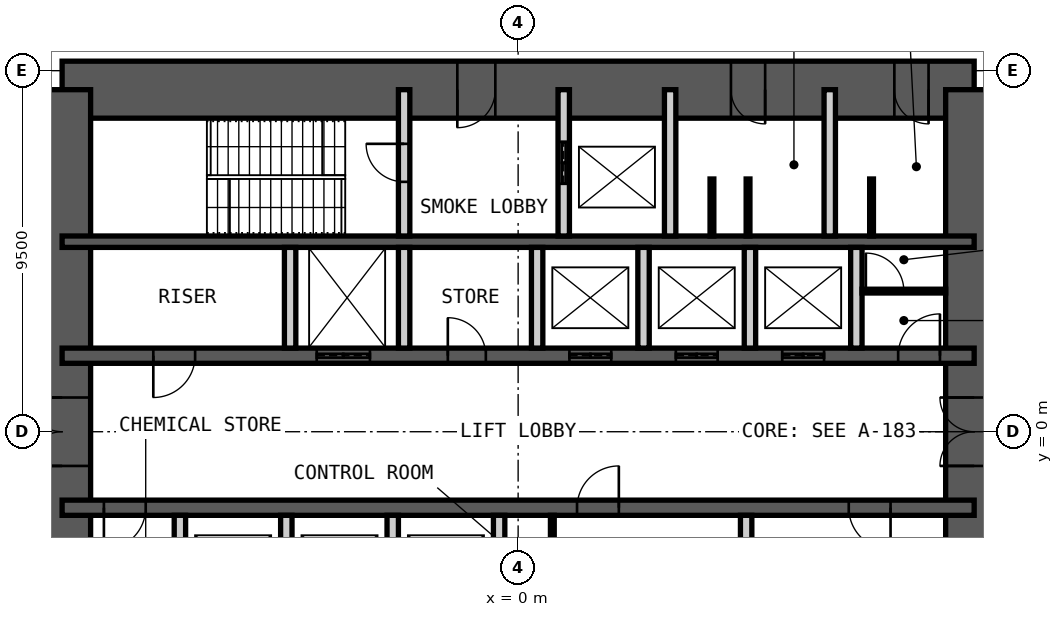
"""IFC4 building model, lengths in metres.
Left out: names, types, materials, properties, quantities, classifications, styles, units other than length and angle.
Written with IfcOpenShell. Run it as: python <this file> out.ifc"""

import sys

from ifc_helpers import new_model, si_unit, direction, frame, frame_2d, origin, place, context, subcontext, project, spatial, rectangle, extrude, element, fill, save


model = new_model("IFC4")
c1 = context("Model", 3, precision=1e-05, world=origin(), true_north=direction((0.0, 1.0)))
c2 = subcontext(c1, "Body", "Model", "MODEL_VIEW")
j1 = project(units=[si_unit("LENGTHUNIT", "METRE"), si_unit("PLANEANGLEUNIT", "RADIAN")], contexts=[c1])
p1 = place(None, origin())
s1 = spatial("IfcSite", under=j1, at=p1, CompositionType="ELEMENT")
p2 = place(p1, origin())
s2 = spatial("IfcBuilding", under=s1, at=p2, CompositionType="ELEMENT")
p3 = place(p2, frame((0.0, 0.0, 22.0)))
s3 = spatial("IfcBuildingStorey", under=s2, at=p3, CompositionType="ELEMENT", Elevation=22.0)
p4 = place(p3, frame((-12.0, 9.0, 0.0), z_axis=(0.0, 0.0, 1.0), x_axis=(1.0, 0.0, 0.0)))
e1 = element("IfcWall", 1, at=p4, inside=s3, PredefinedType="SHEAR", context=c2, shape_type="SweptSolid", body=[
    extrude(rectangle(XDim=24.0, YDim=1.5, at=frame_2d((12.0, 0.0))), origin(), (0.0, 0.0, 1.0), 5.0),
])
p5 = place(p4, frame((10.4, 0.0, 0.0)))
e2 = element("IfcOpeningElement", 2, at=p5, cuts=e1, PredefinedType="OPENING", context=c2, shape_type="SweptSolid", body=[
    extrude(rectangle(XDim=1.0, YDim=2.1, at=frame_2d((0.5, 1.05))), frame((0.0, 0.76, 0.0), z_axis=(0.0, -1.0, 0.0), x_axis=(1.0, 0.0, 0.0)), (0.0, 0.0, 1.0), 1.52),
])
p6 = place(p4, frame((17.6, 0.0, 0.0)))
e3 = element("IfcOpeningElement", 3, at=p6, cuts=e1, PredefinedType="OPENING", context=c2, shape_type="SweptSolid", body=[
    extrude(rectangle(XDim=0.9, YDim=2.1, at=frame_2d((0.45, 1.05))), frame((0.0, 0.76, 0.0), z_axis=(0.0, -1.0, 0.0), x_axis=(1.0, 0.0, 0.0)), (0.0, 0.0, 1.0), 1.52),
])
p7 = place(p4, frame((21.9, 0.0, 0.0)))
e4 = element("IfcOpeningElement", 4, at=p7, cuts=e1, PredefinedType="OPENING", context=c2, shape_type="SweptSolid", body=[
    extrude(rectangle(XDim=0.9, YDim=2.1, at=frame_2d((0.45, 1.05))), frame((0.0, 0.76, 0.0), z_axis=(0.0, -1.0, 0.0), x_axis=(1.0, 0.0, 0.0)), (0.0, 0.0, 1.0), 1.52),
])
p8 = place(p3, frame((12.0, -9.0, 0.0), z_axis=(0.0, 0.0, 1.0), x_axis=(0.0, 1.0, 0.0)))
e5 = element("IfcWall", 5, at=p8, inside=s3, PredefinedType="SHEAR", context=c2, shape_type="SweptSolid", body=[
    extrude(rectangle(XDim=18.0, YDim=1.5, at=frame_2d((9.0, 0.0))), origin(), (0.0, 0.0, 1.0), 5.0),
])
p9 = place(p8, frame((8.1, 0.0, 0.0)))
e6 = element("IfcOpeningElement", 6, at=p9, cuts=e5, PredefinedType="OPENING", context=c2, shape_type="SweptSolid", body=[
    extrude(rectangle(XDim=1.8, YDim=2.1, at=frame_2d((0.9, 1.05))), frame((0.0, 0.76, 0.0), z_axis=(0.0, -1.0, 0.0), x_axis=(1.0, 0.0, 0.0)), (0.0, 0.0, 1.0), 1.52),
])
p10 = place(p3, frame((-12.0, -9.0, 0.0), z_axis=(0.0, 0.0, 1.0), x_axis=(0.0, 1.0, 0.0)))
e7 = element("IfcWall", 7, at=p10, inside=s3, PredefinedType="SHEAR", context=c2, shape_type="SweptSolid", body=[
    extrude(rectangle(XDim=18.0, YDim=1.5, at=frame_2d((9.0, 0.0))), origin(), (0.0, 0.0, 1.0), 5.0),
])
p11 = place(p10, frame((8.1, 0.0, 0.0)))
e8 = element("IfcOpeningElement", 8, at=p11, cuts=e7, PredefinedType="OPENING", context=c2, shape_type="SweptSolid", body=[
    extrude(rectangle(XDim=1.8, YDim=2.1, at=frame_2d((0.9, 1.05))), frame((0.0, 0.76, 0.0), z_axis=(0.0, -1.0, 0.0), x_axis=(1.0, 0.0, 0.0)), (0.0, 0.0, 1.0), 1.52),
])
p12 = place(p3, frame((-12.0, 5.0, 0.0), z_axis=(0.0, 0.0, 1.0), x_axis=(1.0, 0.0, 0.0)))
e9 = element("IfcWall", 9, at=p12, inside=s3, PredefinedType="SHEAR", context=c2, shape_type="SweptSolid", body=[
    extrude(rectangle(XDim=24.0, YDim=0.3, at=frame_2d((12.0, 0.0))), origin(), (0.0, 0.0, 1.0), 5.0),
])
p13 = place(p3, frame((-12.0, 2.0, 0.0), z_axis=(0.0, 0.0, 1.0), x_axis=(1.0, 0.0, 0.0)))
e10 = element("IfcWall", 10, at=p13, inside=s3, PredefinedType="SHEAR", context=c2, shape_type="SweptSolid", body=[
    extrude(rectangle(XDim=24.0, YDim=0.4, at=frame_2d((12.0, 0.0))), origin(), (0.0, 0.0, 1.0), 5.0),
])
p14 = place(p13, frame((2.4, 0.0, 0.0)))
e11 = element("IfcOpeningElement", 11, at=p14, cuts=e10, PredefinedType="OPENING", context=c2, shape_type="SweptSolid", body=[
    extrude(rectangle(XDim=1.1, YDim=2.1, at=frame_2d((0.55, 1.05))), frame((0.0, 0.21, 0.0), z_axis=(0.0, -1.0, 0.0), x_axis=(1.0, 0.0, 0.0)), (0.0, 0.0, 1.0), 0.42),
])
p15 = place(p13, frame((22.0, 0.0, 0.0)))
e12 = element("IfcOpeningElement", 12, at=p15, cuts=e10, PredefinedType="OPENING", context=c2, shape_type="SweptSolid", body=[
    extrude(rectangle(XDim=1.1, YDim=2.1, at=frame_2d((0.55, 1.05))), frame((0.0, 0.21, 0.0), z_axis=(0.0, -1.0, 0.0), x_axis=(1.0, 0.0, 0.0)), (0.0, 0.0, 1.0), 0.42),
])
p16 = place(p13, frame((10.15, 0.0, 0.0)))
e13 = element("IfcOpeningElement", 13, at=p16, cuts=e10, PredefinedType="OPENING", context=c2, shape_type="SweptSolid", body=[
    extrude(rectangle(XDim=1.0, YDim=2.1, at=frame_2d((0.5, 1.05))), frame((0.0, 0.21, 0.0), z_axis=(0.0, -1.0, 0.0), x_axis=(1.0, 0.0, 0.0)), (0.0, 0.0, 1.0), 0.42),
])
p17 = place(p13, frame((6.7, 0.0, 0.0)))
e14 = element("IfcOpeningElement", 14, at=p17, cuts=e10, PredefinedType="OPENING", context=c2, shape_type="SweptSolid", body=[
    extrude(rectangle(XDim=1.4, YDim=2.4, at=frame_2d((0.7, 1.2))), frame((0.0, 0.21, 0.0), z_axis=(0.0, -1.0, 0.0), x_axis=(1.0, 0.0, 0.0)), (0.0, 0.0, 1.0), 0.42),
])
p18 = place(p13, frame((13.35, 0.0, 0.0)))
e15 = element("IfcOpeningElement", 15, at=p18, cuts=e10, PredefinedType="OPENING", context=c2, shape_type="SweptSolid", body=[
    extrude(rectangle(XDim=1.1, YDim=2.4, at=frame_2d((0.55, 1.2))), frame((0.0, 0.21, 0.0), z_axis=(0.0, -1.0, 0.0), x_axis=(1.0, 0.0, 0.0)), (0.0, 0.0, 1.0), 0.42),
])
p19 = place(p13, frame((16.15, 0.0, 0.0)))
e16 = element("IfcOpeningElement", 16, at=p19, cuts=e10, PredefinedType="OPENING", context=c2, shape_type="SweptSolid", body=[
    extrude(rectangle(XDim=1.1, YDim=2.4, at=frame_2d((0.55, 1.2))), frame((0.0, 0.21, 0.0), z_axis=(0.0, -1.0, 0.0), x_axis=(1.0, 0.0, 0.0)), (0.0, 0.0, 1.0), 0.42),
])
p20 = place(p13, frame((18.95, 0.0, 0.0)))
e17 = element("IfcOpeningElement", 17, at=p20, cuts=e10, PredefinedType="OPENING", context=c2, shape_type="SweptSolid", body=[
    extrude(rectangle(XDim=1.1, YDim=2.4, at=frame_2d((0.55, 1.2))), frame((0.0, 0.21, 0.0), z_axis=(0.0, -1.0, 0.0), x_axis=(1.0, 0.0, 0.0)), (0.0, 0.0, 1.0), 0.42),
])
p21 = place(p3, frame((-12.0, -2.0, 0.0), z_axis=(0.0, 0.0, 1.0), x_axis=(1.0, 0.0, 0.0)))
e18 = element("IfcWall", 18, at=p21, inside=s3, PredefinedType="SHEAR", context=c2, shape_type="SweptSolid", body=[
    extrude(rectangle(XDim=24.0, YDim=0.4, at=frame_2d((12.0, 0.0))), origin(), (0.0, 0.0, 1.0), 5.0),
])
p22 = place(p21, frame((1.1, 0.0, 0.0)))
e19 = element("IfcOpeningElement", 19, at=p22, cuts=e18, PredefinedType="OPENING", context=c2, shape_type="SweptSolid", body=[
    extrude(rectangle(XDim=1.1, YDim=2.1, at=frame_2d((0.55, 1.05))), frame((0.0, 0.21, 0.0), z_axis=(0.0, -1.0, 0.0), x_axis=(1.0, 0.0, 0.0)), (0.0, 0.0, 1.0), 0.42),
])
p23 = place(p21, frame((13.55, 0.0, 0.0)))
e20 = element("IfcOpeningElement", 20, at=p23, cuts=e18, PredefinedType="OPENING", context=c2, shape_type="SweptSolid", body=[
    extrude(rectangle(XDim=1.1, YDim=2.1, at=frame_2d((0.55, 1.05))), frame((0.0, 0.21, 0.0), z_axis=(0.0, -1.0, 0.0), x_axis=(1.0, 0.0, 0.0)), (0.0, 0.0, 1.0), 0.42),
])
p24 = place(p21, frame((20.7, 0.0, 0.0)))
e21 = element("IfcOpeningElement", 21, at=p24, cuts=e18, PredefinedType="OPENING", context=c2, shape_type="SweptSolid", body=[
    extrude(rectangle(XDim=1.1, YDim=2.1, at=frame_2d((0.55, 1.05))), frame((0.0, 0.21, 0.0), z_axis=(0.0, -1.0, 0.0), x_axis=(1.0, 0.0, 0.0)), (0.0, 0.0, 1.0), 0.42),
])
p25 = place(p3, frame((-3.0, 5.15, 0.0), z_axis=(0.0, 0.0, 1.0), x_axis=(0.0, 1.0, 0.0)))
e22 = element("IfcWall", 22, at=p25, inside=s3, PredefinedType="PARTITIONING", context=c2, shape_type="SweptSolid", body=[
    extrude(rectangle(XDim=3.85, YDim=0.3, at=frame_2d((1.925, 0.0))), origin(), (0.0, 0.0, 1.0), 4.78),
])
p26 = place(p25, frame((1.425, 0.0, 0.0)))
e23 = element("IfcOpeningElement", 23, at=p26, cuts=e22, PredefinedType="OPENING", context=c2, shape_type="SweptSolid", body=[
    extrude(rectangle(XDim=1.0, YDim=2.1, at=frame_2d((0.5, 1.05))), frame((0.0, 0.16, 0.0), z_axis=(0.0, -1.0, 0.0), x_axis=(1.0, 0.0, 0.0)), (0.0, 0.0, 1.0), 0.32),
])
p27 = place(p3, frame((1.2, 5.15, 0.0), z_axis=(0.0, 0.0, 1.0), x_axis=(0.0, 1.0, 0.0)))
e24 = element("IfcWall", 24, at=p27, inside=s3, PredefinedType="PARTITIONING", context=c2, shape_type="SweptSolid", body=[
    extrude(rectangle(XDim=3.85, YDim=0.3, at=frame_2d((1.925, 0.0))), origin(), (0.0, 0.0, 1.0), 4.78),
])
p28 = place(p27, frame((1.375, 0.0, 0.0)))
e25 = element("IfcOpeningElement", 25, at=p28, cuts=e24, PredefinedType="OPENING", context=c2, shape_type="SweptSolid", body=[
    extrude(rectangle(XDim=1.1, YDim=2.4, at=frame_2d((0.55, 1.2))), frame((0.0, 0.16, 0.0), z_axis=(0.0, -1.0, 0.0), x_axis=(1.0, 0.0, 0.0)), (0.0, 0.0, 1.0), 0.32),
])
for number, where, z_axis, x_axis in (
    (26, (4.0, 5.15, 0.0), (0.0, 0.0, 1.0), (0.0, 1.0, 0.0)),
    (27, (8.2, 5.15, 0.0), (0.0, 0.0, 1.0), (0.0, 1.0, 0.0)),
):
    element("IfcWall", number, at=place(p3, frame(where, z_axis=z_axis, x_axis=x_axis)), inside=s3, PredefinedType="PARTITIONING", context=c2, shape_type="SweptSolid", body=[
        extrude(rectangle(XDim=3.85, YDim=0.3, at=frame_2d((1.925, 0.0))), origin(), (0.0, 0.0, 1.0), 4.78),
    ])
for number, where, z_axis, x_axis in (
    (28, (-6.0, 2.2, 0.0), (0.0, 0.0, 1.0), (0.0, 1.0, 0.0)),
    (29, (-3.0, 2.2, 0.0), (0.0, 0.0, 1.0), (0.0, 1.0, 0.0)),
    (30, (0.5, 2.2, 0.0), (0.0, 0.0, 1.0), (0.0, 1.0, 0.0)),
    (31, (3.3, 2.2, 0.0), (0.0, 0.0, 1.0), (0.0, 1.0, 0.0)),
    (32, (6.1, 2.2, 0.0), (0.0, 0.0, 1.0), (0.0, 1.0, 0.0)),
    (33, (8.9, 2.2, 0.0), (0.0, 0.0, 1.0), (0.0, 1.0, 0.0)),
    (34, (-8.9, -4.85, 0.0), (0.0, 0.0, 1.0), (0.0, 1.0, 0.0)),
    (35, (-6.1, -4.85, 0.0), (0.0, 0.0, 1.0), (0.0, 1.0, 0.0)),
    (36, (-3.3, -4.85, 0.0), (0.0, 0.0, 1.0), (0.0, 1.0, 0.0)),
    (37, (-0.5, -4.85, 0.0), (0.0, 0.0, 1.0), (0.0, 1.0, 0.0)),
    (38, (6.0, -4.85, 0.0), (0.0, 0.0, 1.0), (0.0, 1.0, 0.0)),
):
    element("IfcWall", number, at=place(p3, frame(where, z_axis=z_axis, x_axis=x_axis)), inside=s3, PredefinedType="PARTITIONING", context=c2, shape_type="SweptSolid", body=[
        extrude(rectangle(XDim=2.65, YDim=0.3, at=frame_2d((1.325, 0.0))), origin(), (0.0, 0.0, 1.0), 4.78),
    ])
p29 = place(p3, frame((0.9, -4.85, 0.0), z_axis=(0.0, 0.0, 1.0), x_axis=(0.0, 1.0, 0.0)))
e39 = element("IfcWall", 39, at=p29, inside=s3, PredefinedType="PARTITIONING", context=c2, shape_type="SweptSolid", body=[
    extrude(rectangle(XDim=2.65, YDim=0.1, at=frame_2d((1.325, 0.0))), origin(), (0.0, 0.0, 1.0), 4.78),
])
p30 = place(p29, frame((0.1, 0.0, 0.0)))
e40 = element("IfcOpeningElement", 40, at=p30, cuts=e39, PredefinedType="OPENING", context=c2, shape_type="SweptSolid", body=[
    extrude(rectangle(XDim=1.0, YDim=2.4, at=frame_2d((0.5, 1.2))), frame((0.0, 0.06, 0.0), z_axis=(0.0, -1.0, 0.0), x_axis=(1.0, 0.0, 0.0)), (0.0, 0.0, 1.0), 0.12),
])
p31 = place(p3, frame((9.05, 3.7, 0.0), z_axis=(0.0, 0.0, 1.0), x_axis=(1.0, 0.0, 0.0)))
e41 = element("IfcWall", 41, at=p31, inside=s3, PredefinedType="PARTITIONING", context=c2, shape_type="SweptSolid", body=[
    extrude(rectangle(XDim=2.2, YDim=0.1, at=frame_2d((1.1, 0.0))), origin(), (0.0, 0.0, 1.0), 4.78),
])
p32 = place(p31, frame((0.1, 0.0, 0.0)))
e42 = element("IfcOpeningElement", 42, at=p32, cuts=e41, PredefinedType="OPENING", context=c2, shape_type="SweptSolid", body=[
    extrude(rectangle(XDim=1.0, YDim=2.4, at=frame_2d((0.5, 1.2))), frame((0.0, 0.06, 0.0), z_axis=(0.0, -1.0, 0.0), x_axis=(1.0, 0.0, 0.0)), (0.0, 0.0, 1.0), 0.12),
])
for number, where, z_axis, x_axis in (
    (43, (5.1, 5.15, 0.0), (0.0, 0.0, 1.0), (0.0, 1.0, 0.0)),
    (44, (6.05, 5.15, 0.0), (0.0, 0.0, 1.0), (0.0, 1.0, 0.0)),
    (45, (9.3, 5.15, 0.0), (0.0, 0.0, 1.0), (0.0, 1.0, 0.0)),
):
    element("IfcWall", number, at=place(p3, frame(where, z_axis=z_axis, x_axis=x_axis)), inside=s3, PredefinedType="PARTITIONING", context=c2, shape_type="SweptSolid", body=[
        extrude(rectangle(XDim=1.5, YDim=0.1, at=frame_2d((0.75, 0.0))), origin(), (0.0, 0.0, 1.0), 2.1),
    ])
p33 = place(p5, origin())
e46 = element("IfcDoor", 46, at=p33, inside=s3, OperationType="SINGLE_SWING_LEFT", PredefinedType="DOOR", context=c2, shape_type="SweptSolid", body=[
    extrude(rectangle(XDim=1.0, YDim=2.1, at=frame_2d((0.5, 1.05))), frame((0.0, 0.025, 0.0), z_axis=(0.0, -1.0, 0.0), x_axis=(1.0, 0.0, 0.0)), (0.0, 0.0, 1.0), 0.05),
])
fill(e2, e46)
p34 = place(p6, origin())
e47 = element("IfcDoor", 47, at=p34, inside=s3, OperationType="SINGLE_SWING_RIGHT", PredefinedType="DOOR", context=c2, shape_type="SweptSolid", body=[
    extrude(rectangle(XDim=0.9, YDim=2.1, at=frame_2d((0.45, 1.05))), frame((0.0, 0.025, 0.0), z_axis=(0.0, -1.0, 0.0), x_axis=(1.0, 0.0, 0.0)), (0.0, 0.0, 1.0), 0.05),
])
fill(e3, e47)
p35 = place(p7, origin())
e48 = element("IfcDoor", 48, at=p35, inside=s3, OperationType="SINGLE_SWING_RIGHT", PredefinedType="DOOR", context=c2, shape_type="SweptSolid", body=[
    extrude(rectangle(XDim=0.9, YDim=2.1, at=frame_2d((0.45, 1.05))), frame((0.0, 0.025, 0.0), z_axis=(0.0, -1.0, 0.0), x_axis=(1.0, 0.0, 0.0)), (0.0, 0.0, 1.0), 0.05),
])
fill(e4, e48)
p36 = place(p26, origin())
e49 = element("IfcDoor", 49, at=p36, inside=s3, OperationType="SINGLE_SWING_LEFT", PredefinedType="DOOR", context=c2, shape_type="SweptSolid", body=[
    extrude(rectangle(XDim=1.0, YDim=2.1, at=frame_2d((0.5, 1.05))), frame((0.0, 0.025, 0.0), z_axis=(0.0, -1.0, 0.0), x_axis=(1.0, 0.0, 0.0)), (0.0, 0.0, 1.0), 0.05),
])
fill(e23, e49)
p37 = place(p14, origin())
e50 = element("IfcDoor", 50, at=p37, inside=s3, OperationType="SINGLE_SWING_LEFT", PredefinedType="DOOR", context=c2, shape_type="SweptSolid", body=[
    extrude(rectangle(XDim=1.1, YDim=2.1, at=frame_2d((0.55, 1.05))), frame((0.0, 0.025, 0.0), z_axis=(0.0, -1.0, 0.0), x_axis=(1.0, 0.0, 0.0)), (0.0, 0.0, 1.0), 0.05),
])
fill(e11, e50)
p38 = place(p22, origin())
e51 = element("IfcDoor", 51, at=p38, inside=s3, OperationType="SINGLE_SWING_LEFT", PredefinedType="DOOR", context=c2, shape_type="SweptSolid", body=[
    extrude(rectangle(XDim=1.1, YDim=2.1, at=frame_2d((0.55, 1.05))), frame((0.0, 0.025, 0.0), z_axis=(0.0, -1.0, 0.0), x_axis=(1.0, 0.0, 0.0)), (0.0, 0.0, 1.0), 0.05),
])
fill(e19, e51)
p39 = place(p15, origin())
e52 = element("IfcDoor", 52, at=p39, inside=s3, OperationType="SINGLE_SWING_LEFT", PredefinedType="DOOR", context=c2, shape_type="SweptSolid", body=[
    extrude(rectangle(XDim=1.1, YDim=2.1, at=frame_2d((0.55, 1.05))), frame((0.0, 0.025, 0.0), z_axis=(0.0, -1.0, 0.0), x_axis=(1.0, 0.0, 0.0)), (0.0, 0.0, 1.0), 0.05),
])
fill(e12, e52)
p40 = place(p16, origin())
e53 = element("IfcDoor", 53, at=p40, inside=s3, OperationType="SINGLE_SWING_RIGHT", PredefinedType="DOOR", context=c2, shape_type="SweptSolid", body=[
    extrude(rectangle(XDim=1.0, YDim=2.1, at=frame_2d((0.5, 1.05))), frame((0.0, 0.025, 0.0), z_axis=(0.0, -1.0, 0.0), x_axis=(1.0, 0.0, 0.0)), (0.0, 0.0, 1.0), 0.05),
])
fill(e13, e53)
p41 = place(p23, origin())
e54 = element("IfcDoor", 54, at=p41, inside=s3, OperationType="SINGLE_SWING_LEFT", PredefinedType="DOOR", context=c2, shape_type="SweptSolid", body=[
    extrude(rectangle(XDim=1.1, YDim=2.1, at=frame_2d((0.55, 1.05))), frame((0.0, 0.025, 0.0), z_axis=(0.0, -1.0, 0.0), x_axis=(1.0, 0.0, 0.0)), (0.0, 0.0, 1.0), 0.05),
])
fill(e20, e54)
p42 = place(p24, origin())
e55 = element("IfcDoor", 55, at=p42, inside=s3, OperationType="SINGLE_SWING_RIGHT", PredefinedType="DOOR", context=c2, shape_type="SweptSolid", body=[
    extrude(rectangle(XDim=1.1, YDim=2.1, at=frame_2d((0.55, 1.05))), frame((0.0, 0.025, 0.0), z_axis=(0.0, -1.0, 0.0), x_axis=(1.0, 0.0, 0.0)), (0.0, 0.0, 1.0), 0.05),
])
fill(e21, e55)
p43 = place(p9, origin())
e56 = element("IfcDoor", 56, at=p43, inside=s3, OperationType="DOUBLE_DOOR_DOUBLE_SWING", PredefinedType="DOOR", context=c2, shape_type="SweptSolid", body=[
    extrude(rectangle(XDim=1.8, YDim=2.1, at=frame_2d((0.9, 1.05))), frame((0.0, 0.025, 0.0), z_axis=(0.0, -1.0, 0.0), x_axis=(1.0, 0.0, 0.0)), (0.0, 0.0, 1.0), 0.05),
])
fill(e6, e56)
p44 = place(p11, origin())
e57 = element("IfcDoor", 57, at=p44, inside=s3, OperationType="DOUBLE_DOOR_DOUBLE_SWING", PredefinedType="DOOR", context=c2, shape_type="SweptSolid", body=[
    extrude(rectangle(XDim=1.8, YDim=2.1, at=frame_2d((0.9, 1.05))), frame((0.0, 0.025, 0.0), z_axis=(0.0, -1.0, 0.0), x_axis=(1.0, 0.0, 0.0)), (0.0, 0.0, 1.0), 0.05),
])
fill(e8, e57)
p45 = place(p28, origin())
e58 = element("IfcDoor", 58, at=p45, inside=s3, OperationType="DOUBLE_DOOR_SLIDING", PredefinedType="DOOR", context=c2, shape_type="SweptSolid", body=[
    extrude(rectangle(XDim=1.1, YDim=2.4, at=frame_2d((0.55, 1.2))), frame((0.0, 0.025, 0.0), z_axis=(0.0, -1.0, 0.0), x_axis=(1.0, 0.0, 0.0)), (0.0, 0.0, 1.0), 0.05),
])
fill(e25, e58)
p46 = place(p17, origin())
e59 = element("IfcDoor", 59, at=p46, inside=s3, OperationType="DOUBLE_DOOR_SLIDING", PredefinedType="DOOR", context=c2, shape_type="SweptSolid", body=[
    extrude(rectangle(XDim=1.4, YDim=2.4, at=frame_2d((0.7, 1.2))), frame((0.0, 0.025, 0.0), z_axis=(0.0, -1.0, 0.0), x_axis=(1.0, 0.0, 0.0)), (0.0, 0.0, 1.0), 0.05),
])
fill(e14, e59)
p47 = place(p18, origin())
e60 = element("IfcDoor", 60, at=p47, inside=s3, OperationType="DOUBLE_DOOR_SLIDING", PredefinedType="DOOR", context=c2, shape_type="SweptSolid", body=[
    extrude(rectangle(XDim=1.1, YDim=2.4, at=frame_2d((0.55, 1.2))), frame((0.0, 0.025, 0.0), z_axis=(0.0, -1.0, 0.0), x_axis=(1.0, 0.0, 0.0)), (0.0, 0.0, 1.0), 0.05),
])
fill(e15, e60)
p48 = place(p19, origin())
e61 = element("IfcDoor", 61, at=p48, inside=s3, OperationType="DOUBLE_DOOR_SLIDING", PredefinedType="DOOR", context=c2, shape_type="SweptSolid", body=[
    extrude(rectangle(XDim=1.1, YDim=2.4, at=frame_2d((0.55, 1.2))), frame((0.0, 0.025, 0.0), z_axis=(0.0, -1.0, 0.0), x_axis=(1.0, 0.0, 0.0)), (0.0, 0.0, 1.0), 0.05),
])
fill(e16, e61)
p49 = place(p20, origin())
e62 = element("IfcDoor", 62, at=p49, inside=s3, OperationType="DOUBLE_DOOR_SLIDING", PredefinedType="DOOR", context=c2, shape_type="SweptSolid", body=[
    extrude(rectangle(XDim=1.1, YDim=2.4, at=frame_2d((0.55, 1.2))), frame((0.0, 0.025, 0.0), z_axis=(0.0, -1.0, 0.0), x_axis=(1.0, 0.0, 0.0)), (0.0, 0.0, 1.0), 0.05),
])
fill(e17, e62)
p50 = place(p32, origin())
e63 = element("IfcDoor", 63, at=p50, inside=s3, OperationType="SINGLE_SWING_RIGHT", PredefinedType="DOOR", context=c2, shape_type="SweptSolid", body=[
    extrude(rectangle(XDim=1.0, YDim=2.4, at=frame_2d((0.5, 1.2))), frame((0.0, 0.025, 0.0), z_axis=(0.0, -1.0, 0.0), x_axis=(1.0, 0.0, 0.0)), (0.0, 0.0, 1.0), 0.05),
])
fill(e42, e63)
save(model, sys.argv[1])
